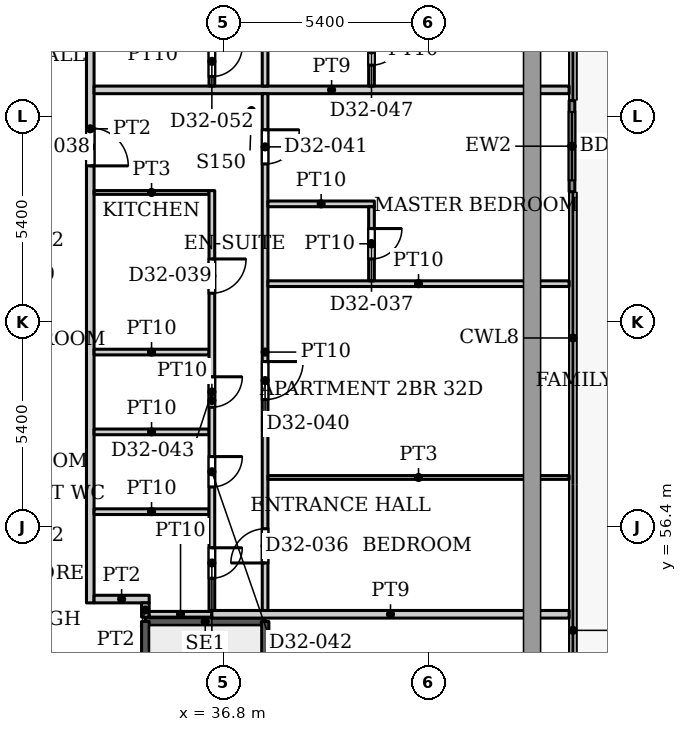
"""IFC4 building model, lengths in metres.
Left out: names, types, materials, properties, quantities, classifications, styles, units other than length and angle.
Written with IfcOpenShell. Run it as: python <this file> out.ifc"""

import sys

from ifc_helpers import new_model, si_unit, direction, frame, frame_2d, origin, place, context, subcontext, project, spatial, rectangle, extrude, source, transform, mapped, element, fill, save


model = new_model("IFC4")
c1 = context("Model", 3, precision=1e-05, world=origin(), true_north=direction((0.0, 1.0)))
c2 = subcontext(c1, "Body", "Model", "MODEL_VIEW")
j1 = project(units=[si_unit("LENGTHUNIT", "METRE"), si_unit("PLANEANGLEUNIT", "RADIAN")], contexts=[c1])
p1 = place(None, origin())
s1 = spatial("IfcSite", under=j1, at=p1, CompositionType="ELEMENT")
p2 = place(p1, origin())
s2 = spatial("IfcBuilding", under=s1, at=p2, CompositionType="ELEMENT")
p3 = place(p2, frame((0.0, 0.0, 137.0)))
s3 = spatial("IfcBuildingStorey", under=s2, at=p3, CompositionType="ELEMENT", Elevation=137.0)
p4 = place(p3, frame((45.975, 67.618, 0.0), z_axis=(0.0, 0.0, 1.0), x_axis=(0.0, -1.0, 0.0)))
e1 = element("IfcWall", 1, at=p4, inside=s3, PredefinedType="SOLIDWALL", context=c2, shape_type="SweptSolid", body=[
    extrude(rectangle(XDim=2.4, YDim=0.15, at=frame_2d((1.2, 0.0))), origin(), (0.0, 0.0, 1.0), 3.75),
])
p5 = place(p4, frame((0.3, 0.0, 0.0)))
e2 = element("IfcOpeningElement", 2, at=p5, cuts=e1, PredefinedType="OPENING", context=c2, shape_type="SweptSolid", body=[
    extrude(rectangle(XDim=1.8, YDim=2.4, at=frame_2d((0.9, 1.2))), frame((0.0, 0.085, 0.0), z_axis=(0.0, -1.0, 0.0), x_axis=(1.0, 0.0, 0.0)), (0.0, 0.0, 1.0), 0.17),
])
p6 = place(p3, frame((34.75, 53.91, 0.0), z_axis=(0.0, 0.0, 1.0), x_axis=(1.0, 0.0, 0.0)))
e3 = element("IfcWall", 3, at=p6, inside=s3, PredefinedType="SHEAR", context=c2, shape_type="SweptSolid", body=[
    extrude(rectangle(XDim=3.15, YDim=0.2, at=frame_2d((1.575, 0.0))), origin(), (0.0, 0.0, 1.0), 3.9),
])
p7 = place(p3, frame((34.75, 47.5, 0.0), z_axis=(0.0, 0.0, 1.0), x_axis=(0.0, 1.0, 0.0)))
e4 = element("IfcWall", 4, at=p7, inside=s3, PredefinedType="SHEAR", context=c2, shape_type="SweptSolid", body=[
    extrude(rectangle(XDim=6.41, YDim=0.2, at=frame_2d((3.205, 0.0))), origin(), (0.0, 0.0, 1.0), 3.9),
])
p8 = place(p3, frame((37.9, 44.75, 0.0), z_axis=(0.0, 0.0, 1.0), x_axis=(0.0, 1.0, 0.0)))
e5 = element("IfcWall", 5, at=p8, inside=s3, PredefinedType="SHEAR", context=c2, shape_type="SweptSolid", body=[
    extrude(rectangle(XDim=9.16, YDim=0.2, at=frame_2d((4.58, 0.0))), origin(), (0.0, 0.0, 1.0), 3.9),
])
p9 = place(p3, frame((33.3, 54.4, 0.0), z_axis=(0.0, 0.0, 1.0), x_axis=(0.0, 1.0, 0.0)))
e6 = element("IfcWall", 6, at=p9, inside=s3, PredefinedType="PARTITIONING", context=c2, shape_type="SweptSolid", body=[
    extrude(rectangle(XDim=24.95, YDim=0.2, at=frame_2d((12.475, 0.0))), origin(), (0.0, 0.0, 1.0), 3.6),
])
p10 = place(p9, frame((11.5, 0.0, 0.0)))
e7 = element("IfcOpeningElement", 7, at=p10, cuts=e6, PredefinedType="OPENING", context=c2, shape_type="SweptSolid", body=[
    extrude(rectangle(XDim=1.0, YDim=2.1, at=frame_2d((0.5, 1.05))), frame((0.0, 0.11, 0.0), z_axis=(0.0, -1.0, 0.0), x_axis=(1.0, 0.0, 0.0)), (0.0, 0.0, 1.0), 0.22),
])
p11 = place(p9, frame((18.7, 0.0, 0.0)))
e8 = element("IfcOpeningElement", 8, at=p11, cuts=e6, PredefinedType="OPENING", context=c2, shape_type="SweptSolid", body=[
    extrude(rectangle(XDim=1.0, YDim=2.1, at=frame_2d((0.5, 1.05))), frame((0.0, 0.11, 0.0), z_axis=(0.0, -1.0, 0.0), x_axis=(1.0, 0.0, 0.0)), (0.0, 0.0, 1.0), 0.22),
])
p12 = place(p3, frame((33.4, 54.5, 0.0), z_axis=(0.0, 0.0, 1.0), x_axis=(1.0, 0.0, 0.0)))
e9 = element("IfcWall", 9, at=p12, inside=s3, PredefinedType="PARTITIONING", context=c2, shape_type="SweptSolid", body=[
    extrude(rectangle(XDim=1.45, YDim=0.2, at=frame_2d((0.725, 0.0))), origin(), (0.0, 0.0, 1.0), 3.6),
])
for number, where, z_axis, x_axis in (
    (10, (33.4, 56.8, 0.0), (0.0, 0.0, 1.0), (1.0, 0.0, 0.0)),
    (11, (33.4, 58.9, 0.0), (0.0, 0.0, 1.0), (1.0, 0.0, 0.0)),
    (12, (33.4, 61.0, 0.0), (0.0, 0.0, 1.0), (1.0, 0.0, 0.0)),
):
    element("IfcWall", number, at=place(p3, frame(where, z_axis=z_axis, x_axis=x_axis)), inside=s3, PredefinedType="PARTITIONING", context=c2, shape_type="SweptSolid", body=[
        extrude(rectangle(XDim=3.025, YDim=0.15, at=frame_2d((1.513, 0.0))), origin(), (0.0, 0.0, 1.0), 3.6),
    ])
p13 = place(p3, frame((33.4, 65.2, 0.0), z_axis=(0.0, 0.0, 1.0), x_axis=(1.0, 0.0, 0.0)))
e13 = element("IfcWall", 13, at=p13, inside=s3, PredefinedType="PARTITIONING", context=c2, shape_type="SweptSolid", body=[
    extrude(rectangle(XDim=3.025, YDim=0.1, at=frame_2d((1.513, 0.0))), origin(), (0.0, 0.0, 1.0), 3.6),
])
p14 = place(p3, frame((33.4, 67.9, 0.0), z_axis=(0.0, 0.0, 1.0), x_axis=(1.0, 0.0, 0.0)))
e14 = element("IfcWall", 14, at=p14, inside=s3, PredefinedType="PARTITIONING", context=c2, shape_type="SweptSolid", body=[
    extrude(rectangle(XDim=12.5, YDim=0.2, at=frame_2d((6.25, 0.0))), origin(), (0.0, 0.0, 1.0), 3.6),
])
p15 = place(p3, frame((34.75, 54.025, 0.0), z_axis=(0.0, 0.0, 1.0), x_axis=(0.0, 1.0, 0.0)))
e15 = element("IfcWall", 15, at=p15, inside=s3, PredefinedType="PARTITIONING", context=c2, shape_type="SweptSolid", body=[
    extrude(rectangle(XDim=0.375, YDim=0.2, at=frame_2d((0.188, 0.0))), origin(), (0.0, 0.0, 1.0), 3.6),
])
p16 = place(p3, frame((34.85, 54.1, 0.0), z_axis=(0.0, 0.0, 1.0), x_axis=(1.0, 0.0, 0.0)))
e16 = element("IfcWall", 16, at=p16, inside=s3, PredefinedType="PARTITIONING", context=c2, shape_type="SweptSolid", body=[
    extrude(rectangle(XDim=1.65, YDim=0.15, at=frame_2d((0.825, 0.0))), origin(), (0.0, 0.0, 1.0), 3.6),
])
p17 = place(p3, frame((36.5, 54.1, 0.0), z_axis=(0.0, 0.0, 1.0), x_axis=(1.0, 0.0, 0.0)))
e17 = element("IfcWall", 17, at=p17, inside=s3, PredefinedType="PARTITIONING", context=c2, shape_type="SweptSolid", body=[
    extrude(rectangle(XDim=9.4, YDim=0.2, at=frame_2d((4.7, 0.0))), origin(), (0.0, 0.0, 1.0), 3.6),
])
p18 = place(p3, frame((36.5, 54.2, 0.0), z_axis=(0.0, 0.0, 1.0), x_axis=(0.0, 1.0, 0.0)))
e18 = element("IfcWall", 18, at=p18, inside=s3, PredefinedType="PARTITIONING", context=c2, shape_type="SweptSolid", body=[
    extrude(rectangle(XDim=11.05, YDim=0.15, at=frame_2d((5.525, 0.0))), origin(), (0.0, 0.0, 1.0), 3.6),
])
p19 = place(p18, frame((0.85, 0.0, 0.0)))
e19 = element("IfcOpeningElement", 19, at=p19, cuts=e18, PredefinedType="OPENING", context=c2, shape_type="SweptSolid", body=[
    extrude(rectangle(XDim=0.8, YDim=2.1, at=frame_2d((0.4, 1.05))), frame((0.0, 0.085, 0.0), z_axis=(0.0, -1.0, 0.0), x_axis=(1.0, 0.0, 0.0)), (0.0, 0.0, 1.0), 0.17),
])
p20 = place(p18, frame((8.35, 0.0, 0.0)))
e20 = element("IfcOpeningElement", 20, at=p20, cuts=e18, PredefinedType="OPENING", context=c2, shape_type="SweptSolid", body=[
    extrude(rectangle(XDim=0.9, YDim=2.1, at=frame_2d((0.45, 1.05))), frame((0.0, 0.085, 0.0), z_axis=(0.0, -1.0, 0.0), x_axis=(1.0, 0.0, 0.0)), (0.0, 0.0, 1.0), 0.17),
])
p21 = place(p18, frame((3.25, 0.0, 0.0)))
e21 = element("IfcOpeningElement", 21, at=p21, cuts=e18, PredefinedType="OPENING", context=c2, shape_type="SweptSolid", body=[
    extrude(rectangle(XDim=0.8, YDim=2.1, at=frame_2d((0.4, 1.05))), frame((0.0, 0.085, 0.0), z_axis=(0.0, -1.0, 0.0), x_axis=(1.0, 0.0, 0.0)), (0.0, 0.0, 1.0), 0.17),
])
p22 = place(p18, frame((5.35, 0.0, 0.0)))
e22 = element("IfcOpeningElement", 22, at=p22, cuts=e18, PredefinedType="OPENING", context=c2, shape_type="SweptSolid", body=[
    extrude(rectangle(XDim=0.8, YDim=2.1, at=frame_2d((0.4, 1.05))), frame((0.0, 0.085, 0.0), z_axis=(0.0, -1.0, 0.0), x_axis=(1.0, 0.0, 0.0)), (0.0, 0.0, 1.0), 0.17),
])
p23 = place(p3, frame((36.5, 68.0, 0.0), z_axis=(0.0, 0.0, 1.0), x_axis=(0.0, 1.0, 0.0)))
e23 = element("IfcWall", 23, at=p23, inside=s3, PredefinedType="PARTITIONING", context=c2, shape_type="SweptSolid", body=[
    extrude(rectangle(XDim=4.75, YDim=0.15, at=frame_2d((2.375, 0.0))), origin(), (0.0, 0.0, 1.0), 3.6),
])
p24 = place(p23, frame((2.6, 0.0, 0.0)))
e24 = element("IfcOpeningElement", 24, at=p24, cuts=e23, PredefinedType="OPENING", context=c2, shape_type="SweptSolid", body=[
    extrude(rectangle(XDim=0.9, YDim=2.1, at=frame_2d((0.45, 1.05))), frame((0.0, 0.085, 0.0), z_axis=(0.0, -1.0, 0.0), x_axis=(1.0, 0.0, 0.0)), (0.0, 0.0, 1.0), 0.17),
])
p25 = place(p23, frame((0.25, 0.0, 0.0)))
e25 = element("IfcOpeningElement", 25, at=p25, cuts=e23, PredefinedType="OPENING", context=c2, shape_type="SweptSolid", body=[
    extrude(rectangle(XDim=0.8, YDim=2.1, at=frame_2d((0.4, 1.05))), frame((0.0, 0.085, 0.0), z_axis=(0.0, -1.0, 0.0), x_axis=(1.0, 0.0, 0.0)), (0.0, 0.0, 1.0), 0.17),
])
p26 = place(p3, frame((37.9, 54.2, 0.0), z_axis=(0.0, 0.0, 1.0), x_axis=(0.0, 1.0, 0.0)))
e26 = element("IfcWall", 26, at=p26, inside=s3, PredefinedType="PARTITIONING", context=c2, shape_type="SweptSolid", body=[
    extrude(rectangle(XDim=13.6, YDim=0.15, at=frame_2d((6.8, 0.0))), origin(), (0.0, 0.0, 1.0), 3.6),
])
p27 = place(p26, frame((1.25, 0.0, 0.0)))
e27 = element("IfcOpeningElement", 27, at=p27, cuts=e26, PredefinedType="OPENING", context=c2, shape_type="SweptSolid", body=[
    extrude(rectangle(XDim=0.9, YDim=2.1, at=frame_2d((0.45, 1.05))), frame((0.0, 0.085, 0.0), z_axis=(0.0, -1.0, 0.0), x_axis=(1.0, 0.0, 0.0)), (0.0, 0.0, 1.0), 0.17),
])
p28 = place(p26, frame((5.55, 0.0, 0.0)))
e28 = element("IfcOpeningElement", 28, at=p28, cuts=e26, PredefinedType="OPENING", context=c2, shape_type="SweptSolid", body=[
    extrude(rectangle(XDim=1.0, YDim=2.1, at=frame_2d((0.5, 1.05))), frame((0.0, 0.085, 0.0), z_axis=(0.0, -1.0, 0.0), x_axis=(1.0, 0.0, 0.0)), (0.0, 0.0, 1.0), 0.17),
])
p29 = place(p26, frame((11.75, 0.0, 0.0)))
e29 = element("IfcOpeningElement", 29, at=p29, cuts=e26, PredefinedType="OPENING", context=c2, shape_type="SweptSolid", body=[
    extrude(rectangle(XDim=0.9, YDim=2.1, at=frame_2d((0.45, 1.05))), frame((0.0, 0.085, 0.0), z_axis=(0.0, -1.0, 0.0), x_axis=(1.0, 0.0, 0.0)), (0.0, 0.0, 1.0), 0.17),
])
p30 = place(p3, frame((37.9, 68.0, 0.0), z_axis=(0.0, 0.0, 1.0), x_axis=(0.0, 1.0, 0.0)))
e30 = element("IfcWall", 30, at=p30, inside=s3, PredefinedType="PARTITIONING", context=c2, shape_type="SweptSolid", body=[
    extrude(rectangle(XDim=11.25, YDim=0.15, at=frame_2d((5.625, 0.0))), origin(), (0.0, 0.0, 1.0), 3.6),
])
p31 = place(p30, frame((9.2, 0.0, 0.0)))
e31 = element("IfcOpeningElement", 31, at=p31, cuts=e30, PredefinedType="OPENING", context=c2, shape_type="SweptSolid", body=[
    extrude(rectangle(XDim=0.9, YDim=2.1, at=frame_2d((0.45, 1.05))), frame((0.0, 0.085, 0.0), z_axis=(0.0, -1.0, 0.0), x_axis=(1.0, 0.0, 0.0)), (0.0, 0.0, 1.0), 0.17),
])
p32 = place(p30, frame((5.4, 0.0, 0.0)))
e32 = element("IfcOpeningElement", 32, at=p32, cuts=e30, PredefinedType="OPENING", context=c2, shape_type="SweptSolid", body=[
    extrude(rectangle(XDim=1.0, YDim=2.1, at=frame_2d((0.5, 1.05))), frame((0.0, 0.085, 0.0), z_axis=(0.0, -1.0, 0.0), x_axis=(1.0, 0.0, 0.0)), (0.0, 0.0, 1.0), 0.17),
])
p33 = place(p30, frame((2.45, 0.0, 0.0)))
e33 = element("IfcOpeningElement", 33, at=p33, cuts=e30, PredefinedType="OPENING", context=c2, shape_type="SweptSolid", body=[
    extrude(rectangle(XDim=0.9, YDim=2.1, at=frame_2d((0.45, 1.05))), frame((0.0, 0.085, 0.0), z_axis=(0.0, -1.0, 0.0), x_axis=(1.0, 0.0, 0.0)), (0.0, 0.0, 1.0), 0.17),
])
p34 = place(p3, frame((37.975, 57.7, 0.0), z_axis=(0.0, 0.0, 1.0), x_axis=(1.0, 0.0, 0.0)))
e34 = element("IfcWall", 34, at=p34, inside=s3, PredefinedType="PARTITIONING", context=c2, shape_type="SweptSolid", body=[
    extrude(rectangle(XDim=7.925, YDim=0.1, at=frame_2d((3.962, 0.0))), origin(), (0.0, 0.0, 1.0), 3.6),
])
p35 = place(p3, frame((37.975, 62.8, 0.0), z_axis=(0.0, 0.0, 1.0), x_axis=(1.0, 0.0, 0.0)))
e35 = element("IfcWall", 35, at=p35, inside=s3, PredefinedType="PARTITIONING", context=c2, shape_type="SweptSolid", body=[
    extrude(rectangle(XDim=7.925, YDim=0.15, at=frame_2d((3.962, 0.0))), origin(), (0.0, 0.0, 1.0), 3.6),
])
p36 = place(p3, frame((37.975, 64.9, 0.0), z_axis=(0.0, 0.0, 1.0), x_axis=(1.0, 0.0, 0.0)))
e36 = element("IfcWall", 36, at=p36, inside=s3, PredefinedType="PARTITIONING", context=c2, shape_type="SweptSolid", body=[
    extrude(rectangle(XDim=2.8, YDim=0.15, at=frame_2d((1.4, 0.0))), origin(), (0.0, 0.0, 1.0), 3.6),
])
p37 = place(p3, frame((40.7, 62.875, 0.0), z_axis=(0.0, 0.0, 1.0), x_axis=(0.0, 1.0, 0.0)))
e37 = element("IfcWall", 37, at=p37, inside=s3, PredefinedType="PARTITIONING", context=c2, shape_type="SweptSolid", body=[
    extrude(rectangle(XDim=1.95, YDim=0.15, at=frame_2d((0.975, 0.0))), origin(), (0.0, 0.0, 1.0), 3.6),
])
p38 = place(p37, frame((0.575, 0.0, 0.0)))
e38 = element("IfcOpeningElement", 38, at=p38, cuts=e37, PredefinedType="OPENING", context=c2, shape_type="SweptSolid", body=[
    extrude(rectangle(XDim=0.8, YDim=2.1, at=frame_2d((0.4, 1.05))), frame((0.0, 0.085, 0.0), z_axis=(0.0, -1.0, 0.0), x_axis=(1.0, 0.0, 0.0)), (0.0, 0.0, 1.0), 0.17),
])
p39 = place(p3, frame((40.7, 68.0, 0.0), z_axis=(0.0, 0.0, 1.0), x_axis=(0.0, 1.0, 0.0)))
e39 = element("IfcWall", 39, at=p39, inside=s3, PredefinedType="PARTITIONING", context=c2, shape_type="SweptSolid", body=[
    extrude(rectangle(XDim=1.925, YDim=0.15, at=frame_2d((0.962, 0.0))), origin(), (0.0, 0.0, 1.0), 3.6),
])
p40 = place(p39, frame((0.55, 0.0, 0.0)))
e40 = element("IfcOpeningElement", 40, at=p40, cuts=e39, PredefinedType="OPENING", context=c2, shape_type="SweptSolid", body=[
    extrude(rectangle(XDim=0.8, YDim=2.1, at=frame_2d((0.4, 1.05))), frame((0.0, 0.085, 0.0), z_axis=(0.0, -1.0, 0.0), x_axis=(1.0, 0.0, 0.0)), (0.0, 0.0, 1.0), 0.17),
])
m1 = source(origin(), c2, "Body", "SweptSolid", [
    extrude(rectangle(XDim=1.8, YDim=2.4, at=frame_2d((0.9, 1.2))), frame((0.0, 0.025, 0.0), z_axis=(0.0, -1.0, 0.0), x_axis=(1.0, 0.0, 0.0)), (0.0, 0.0, 1.0), 0.05),
])
p41 = place(p5, origin())
e41 = element("IfcDoor", 41, at=p41, inside=s3, OperationType="SLIDING_TO_LEFT", PredefinedType="DOOR", context=c2, shape_type="MappedRepresentation", body=[
    mapped(m1, transform((0.0, 0.0, 0.0), x_axis=(1.0, 0.0, 0.0), y_axis=(0.0, 1.0, 0.0), z_axis=(0.0, 0.0, 1.0), scale=1.0)),
])
fill(e2, e41)
m2 = source(origin(), c2, "Body", "SweptSolid", [
    extrude(rectangle(XDim=0.8, YDim=2.1, at=frame_2d((0.4, 1.05))), frame((0.0, 0.025, 0.0), z_axis=(0.0, -1.0, 0.0), x_axis=(1.0, 0.0, 0.0)), (0.0, 0.0, 1.0), 0.05),
])
p42 = place(p19, origin())
e42 = element("IfcDoor", 42, at=p42, inside=s3, OperationType="SINGLE_SWING_RIGHT", PredefinedType="DOOR", context=c2, shape_type="MappedRepresentation", body=[
    mapped(m2, transform((0.0, 0.0, 0.0), x_axis=(1.0, 0.0, 0.0), y_axis=(0.0, 1.0, 0.0), z_axis=(0.0, 0.0, 1.0), scale=1.0)),
])
fill(e19, e42)
m3 = source(origin(), c2, "Body", "SweptSolid", [
    extrude(rectangle(XDim=0.9, YDim=2.1, at=frame_2d((0.45, 1.05))), frame((0.0, 0.025, 0.0), z_axis=(0.0, -1.0, 0.0), x_axis=(1.0, 0.0, 0.0)), (0.0, 0.0, 1.0), 0.05),
])
p43 = place(p27, origin())
e43 = element("IfcDoor", 43, at=p43, inside=s3, OperationType="SINGLE_SWING_LEFT", PredefinedType="DOOR", context=c2, shape_type="MappedRepresentation", body=[
    mapped(m3, transform((0.0, 0.0, 0.0), x_axis=(1.0, 0.0, 0.0), y_axis=(0.0, 1.0, 0.0), z_axis=(0.0, 0.0, 1.0), scale=1.0)),
])
fill(e27, e43)
p44 = place(p38, origin())
e44 = element("IfcDoor", 44, at=p44, inside=s3, OperationType="SINGLE_SWING_RIGHT", PredefinedType="DOOR", context=c2, shape_type="MappedRepresentation", body=[
    mapped(m2, transform((0.0, 0.0, 0.0), x_axis=(1.0, 0.0, 0.0), y_axis=(0.0, 1.0, 0.0), z_axis=(0.0, 0.0, 1.0), scale=1.0)),
])
fill(e38, e44)
m4 = source(origin(), c2, "Body", "SweptSolid", [
    extrude(rectangle(XDim=1.0, YDim=2.1, at=frame_2d((0.5, 1.05))), frame((0.0, 0.025, 0.0), z_axis=(0.0, -1.0, 0.0), x_axis=(1.0, 0.0, 0.0)), (0.0, 0.0, 1.0), 0.05),
])
p45 = place(p10, origin())
e45 = element("IfcDoor", 45, at=p45, inside=s3, OperationType="SINGLE_SWING_RIGHT", PredefinedType="DOOR", context=c2, shape_type="MappedRepresentation", body=[
    mapped(m4, transform((0.0, 0.0, 0.0), x_axis=(1.0, 0.0, 0.0), y_axis=(0.0, 1.0, 0.0), z_axis=(0.0, 0.0, 1.0), scale=1.0)),
])
fill(e7, e45)
p46 = place(p20, origin())
e46 = element("IfcDoor", 46, at=p46, inside=s3, OperationType="SINGLE_SWING_RIGHT", PredefinedType="DOOR", context=c2, shape_type="MappedRepresentation", body=[
    mapped(m3, transform((0.0, 0.0, 0.0), x_axis=(1.0, 0.0, 0.0), y_axis=(0.0, 1.0, 0.0), z_axis=(0.0, 0.0, 1.0), scale=1.0)),
])
fill(e20, e46)
m5 = source(origin(), c2, "Body", "SweptSolid", [
    extrude(rectangle(XDim=1.0, YDim=2.1, at=frame_2d((0.5, 1.05))), frame((0.0, 0.025, 0.0), z_axis=(0.0, -1.0, 0.0), x_axis=(1.0, 0.0, 0.0)), (0.0, 0.0, 1.0), 0.05),
])
p47 = place(p28, origin())
e47 = element("IfcDoor", 47, at=p47, inside=s3, OperationType="SINGLE_SWING_RIGHT", PredefinedType="DOOR", context=c2, shape_type="MappedRepresentation", body=[
    mapped(m5, transform((0.0, 0.0, 0.0), x_axis=(1.0, 0.0, 0.0), y_axis=(0.0, 1.0, 0.0), z_axis=(0.0, 0.0, 1.0), scale=1.0)),
])
fill(e28, e47)
p48 = place(p29, origin())
e48 = element("IfcDoor", 48, at=p48, inside=s3, OperationType="SINGLE_SWING_RIGHT", PredefinedType="DOOR", context=c2, shape_type="MappedRepresentation", body=[
    mapped(m3, transform((0.0, 0.0, 0.0), x_axis=(1.0, 0.0, 0.0), y_axis=(0.0, 1.0, 0.0), z_axis=(0.0, 0.0, 1.0), scale=1.0)),
])
fill(e29, e48)
p49 = place(p21, origin())
e49 = element("IfcDoor", 49, at=p49, inside=s3, OperationType="SINGLE_SWING_RIGHT", PredefinedType="DOOR", context=c2, shape_type="MappedRepresentation", body=[
    mapped(m2, transform((0.0, 0.0, 0.0), x_axis=(1.0, 0.0, 0.0), y_axis=(0.0, 1.0, 0.0), z_axis=(0.0, 0.0, 1.0), scale=1.0)),
])
fill(e21, e49)
p50 = place(p22, origin())
e50 = element("IfcDoor", 50, at=p50, inside=s3, OperationType="SINGLE_SWING_RIGHT", PredefinedType="DOOR", context=c2, shape_type="MappedRepresentation", body=[
    mapped(m2, transform((0.0, 0.0, 0.0), x_axis=(1.0, 0.0, 0.0), y_axis=(0.0, 1.0, 0.0), z_axis=(0.0, 0.0, 1.0), scale=1.0)),
])
fill(e22, e50)
p51 = place(p40, origin())
e51 = element("IfcDoor", 51, at=p51, inside=s3, OperationType="SINGLE_SWING_RIGHT", PredefinedType="DOOR", context=c2, shape_type="MappedRepresentation", body=[
    mapped(m2, transform((0.0, 0.0, 0.0), x_axis=(1.0, 0.0, 0.0), y_axis=(0.0, 1.0, 0.0), z_axis=(0.0, 0.0, 1.0), scale=1.0)),
])
fill(e40, e51)
p52 = place(p25, origin())
e52 = element("IfcDoor", 52, at=p52, inside=s3, OperationType="SINGLE_SWING_RIGHT", PredefinedType="DOOR", context=c2, shape_type="MappedRepresentation", body=[
    mapped(m2, transform((0.0, 0.0, 0.0), x_axis=(1.0, 0.0, 0.0), y_axis=(0.0, 1.0, 0.0), z_axis=(0.0, 0.0, 1.0), scale=1.0)),
])
fill(e25, e52)
save(model, sys.argv[1])
